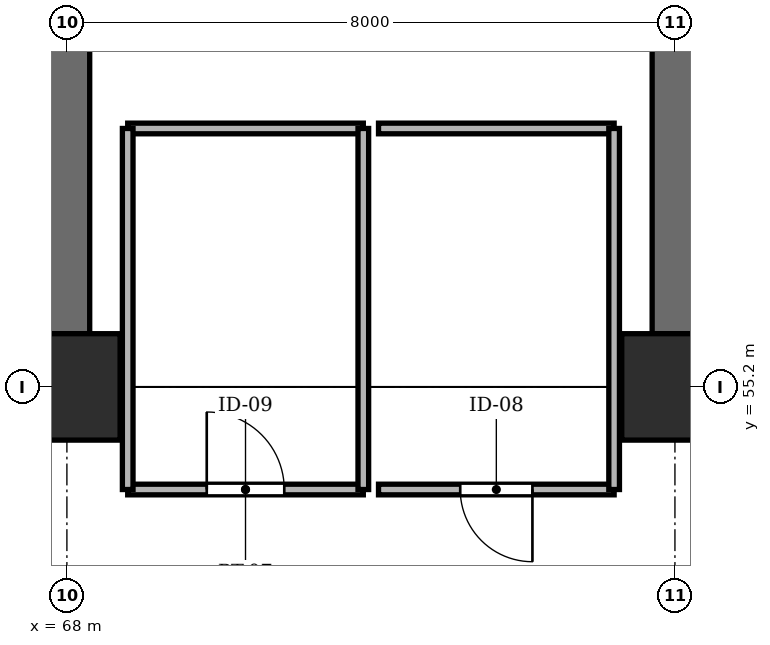
"""IFC4 building model, lengths in metres.
Left out: names, types, materials, properties, quantities, classifications, styles, units other than length and angle.
Written with IfcOpenShell. Run it as: python <this file> out.ifc"""

import sys

from ifc_helpers import new_model, si_unit, direction, frame, frame_2d, origin, origin_2d, place, context, subcontext, project, spatial, rectangle, extrude, element, fill, save


model = new_model("IFC4")
c1 = context("Model", 3, precision=1e-05, world=origin(), true_north=direction((0.0, 1.0)))
c2 = subcontext(c1, "Body", "Model", "MODEL_VIEW")
j1 = project(units=[si_unit("LENGTHUNIT", "METRE"), si_unit("PLANEANGLEUNIT", "RADIAN")], contexts=[c1])
p1 = place(None, origin())
s1 = spatial("IfcSite", under=j1, at=p1, CompositionType="ELEMENT")
p2 = place(p1, origin())
s2 = spatial("IfcBuilding", under=s1, at=p2, CompositionType="ELEMENT")
p3 = place(p2, frame((0.0, 0.0, -9.0)))
s3 = spatial("IfcBuildingStorey", under=s2, at=p3, CompositionType="ELEMENT", Elevation=-9.0)
for number, where, z_axis, x_axis in (
    (1, (68.0, 55.2, 0.0), (0.0, 0.0, 1.0), (1.0, 0.0, 0.0)),
    (2, (76.0, 55.2, 0.0), (0.0, 0.0, 1.0), (1.0, 0.0, 0.0)),
):
    element("IfcColumn", number, at=place(p3, frame(where, z_axis=z_axis, x_axis=x_axis)), inside=s3, PredefinedType="COLUMN", context=c2, shape_type="SweptSolid", body=[
        extrude(rectangle(XDim=1.4, YDim=1.4, at=origin_2d()), origin(), (0.0, 0.0, 1.0), 4.18),
    ])
for number, where, z_axis, x_axis in (
    (3, (68.0, 55.9, -0.55), (0.0, 0.0, 1.0), (0.0, 1.0, 0.0)),
    (4, (76.0, 55.9, -0.55), (0.0, 0.0, 1.0), (0.0, 1.0, 0.0)),
):
    element("IfcWall", number, at=place(p3, frame(where, z_axis=z_axis, x_axis=x_axis)), inside=s3, PredefinedType="SHEAR", context=c2, shape_type="SweptSolid", body=[
        extrude(rectangle(XDim=5.9, YDim=0.6, at=frame_2d((2.95, 0.0))), origin(), (0.0, 0.0, 1.0), 4.73),
    ])
p4 = place(p3, frame((68.8, 53.85, 0.0), z_axis=(0.0, 0.0, 1.0), x_axis=(1.0, 0.0, 0.0)))
e5 = element("IfcWall", 5, at=p4, inside=s3, PredefinedType="PARTITIONING", context=c2, shape_type="SweptSolid", body=[
    extrude(rectangle(XDim=3.1, YDim=0.14, at=frame_2d((1.55, 0.0))), origin(), (0.0, 0.0, 1.0), 3.78),
])
p5 = place(p4, frame((1.04, 0.0, 0.0)))
e6 = element("IfcOpeningElement", 6, at=p5, cuts=e5, PredefinedType="OPENING", context=c2, shape_type="SweptSolid", body=[
    extrude(rectangle(XDim=1.02, YDim=2.1, at=frame_2d((0.51, 1.05))), frame((0.0, 0.082, 0.0), z_axis=(0.0, -1.0, 0.0), x_axis=(1.0, 0.0, 0.0)), (0.0, 0.0, 1.0), 0.164),
])
p6 = place(p3, frame((68.8, 58.6, 0.0), z_axis=(0.0, 0.0, 1.0), x_axis=(1.0, 0.0, 0.0)))
e7 = element("IfcWall", 7, at=p6, inside=s3, PredefinedType="PARTITIONING", context=c2, shape_type="SweptSolid", body=[
    extrude(rectangle(XDim=3.1, YDim=0.14, at=frame_2d((1.55, 0.0))), origin(), (0.0, 0.0, 1.0), 3.78),
])
for number, where, z_axis, x_axis in (
    (8, (68.8, 53.85, 0.0), (0.0, 0.0, 1.0), (0.0, 1.0, 0.0)),
    (9, (71.9, 53.85, 0.0), (0.0, 0.0, 1.0), (0.0, 1.0, 0.0)),
):
    element("IfcWall", number, at=place(p3, frame(where, z_axis=z_axis, x_axis=x_axis)), inside=s3, PredefinedType="PARTITIONING", context=c2, shape_type="SweptSolid", body=[
        extrude(rectangle(XDim=4.75, YDim=0.14, at=frame_2d((2.375, 0.0))), origin(), (0.0, 0.0, 1.0), 3.78),
    ])
p7 = place(p3, frame((72.1, 53.85, 0.0), z_axis=(0.0, 0.0, 1.0), x_axis=(1.0, 0.0, 0.0)))
e10 = element("IfcWall", 10, at=p7, inside=s3, PredefinedType="PARTITIONING", context=c2, shape_type="SweptSolid", body=[
    extrude(rectangle(XDim=3.1, YDim=0.14, at=frame_2d((1.55, 0.0))), origin(), (0.0, 0.0, 1.0), 3.78),
])
p8 = place(p7, frame((1.075, 0.0, 0.0)))
e11 = element("IfcOpeningElement", 11, at=p8, cuts=e10, PredefinedType="OPENING", context=c2, shape_type="SweptSolid", body=[
    extrude(rectangle(XDim=0.95, YDim=2.1, at=frame_2d((0.475, 1.05))), frame((0.0, 0.082, 0.0), z_axis=(0.0, -1.0, 0.0), x_axis=(1.0, 0.0, 0.0)), (0.0, 0.0, 1.0), 0.164),
])
p9 = place(p3, frame((72.1, 58.6, 0.0), z_axis=(0.0, 0.0, 1.0), x_axis=(1.0, 0.0, 0.0)))
e12 = element("IfcWall", 12, at=p9, inside=s3, PredefinedType="PARTITIONING", context=c2, shape_type="SweptSolid", body=[
    extrude(rectangle(XDim=3.1, YDim=0.14, at=frame_2d((1.55, 0.0))), origin(), (0.0, 0.0, 1.0), 3.78),
])
p10 = place(p3, frame((75.2, 53.85, 0.0), z_axis=(0.0, 0.0, 1.0), x_axis=(0.0, 1.0, 0.0)))
e13 = element("IfcWall", 13, at=p10, inside=s3, PredefinedType="PARTITIONING", context=c2, shape_type="SweptSolid", body=[
    extrude(rectangle(XDim=4.75, YDim=0.14, at=frame_2d((2.375, 0.0))), origin(), (0.0, 0.0, 1.0), 3.78),
])
p11 = place(p5, origin())
e14 = element("IfcDoor", 14, at=p11, inside=s3, OperationType="SINGLE_SWING_LEFT", PredefinedType="DOOR", context=c2, shape_type="SweptSolid", body=[
    extrude(rectangle(XDim=1.02, YDim=2.1, at=frame_2d((0.51, 1.05))), frame((0.0, 0.025, 0.0), z_axis=(0.0, -1.0, 0.0), x_axis=(1.0, 0.0, 0.0)), (0.0, 0.0, 1.0), 0.05),
])
fill(e6, e14)
p12 = place(p8, frame((0.95, 0.0, 0.0), z_axis=(0.0, 0.0, 1.0), x_axis=(-1.0, 0.0, 0.0)))
e15 = element("IfcDoor", 15, at=p12, inside=s3, OperationType="SINGLE_SWING_RIGHT", PredefinedType="DOOR", context=c2, shape_type="SweptSolid", body=[
    extrude(rectangle(XDim=0.95, YDim=2.1, at=frame_2d((0.475, 1.05))), frame((0.0, 0.025, 0.0), z_axis=(0.0, -1.0, 0.0), x_axis=(1.0, 0.0, 0.0)), (0.0, 0.0, 1.0), 0.05),
])
fill(e11, e15)
save(model, sys.argv[1])
